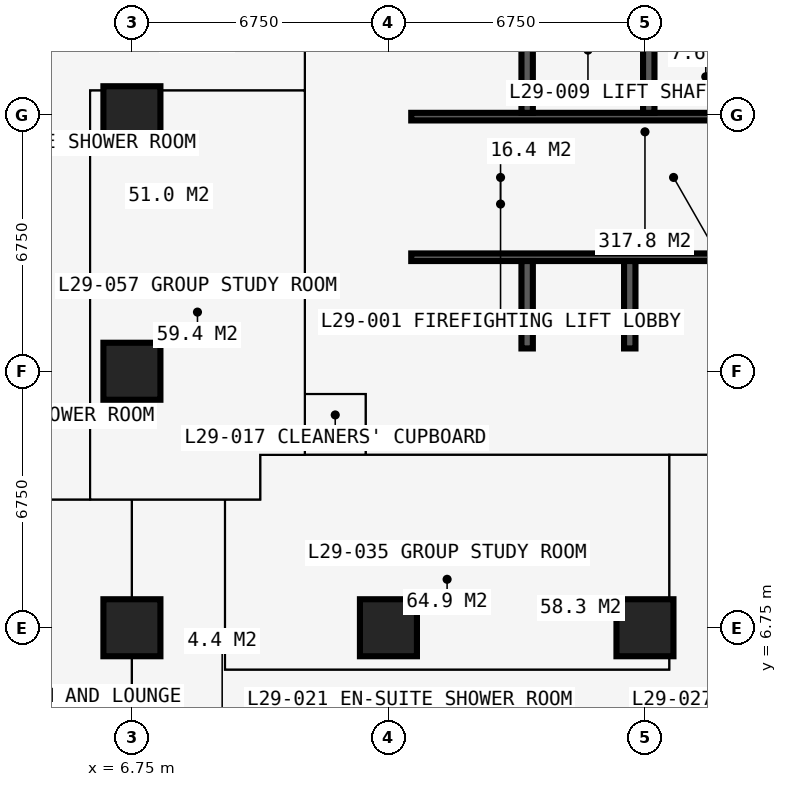
"""IFC4 building model, lengths in metres.
Left out: names, types, materials, properties, quantities, classifications, styles, units other than length and angle.
Written with IfcOpenShell. Run it as: python <this file> out.ifc"""

import sys

from ifc_helpers import new_model, si_unit, direction, frame, frame_2d, origin, origin_2d, place, context, subcontext, project, spatial, rectangle, extrude, element, fill, save


model = new_model("IFC4")
c1 = context("Model", 3, precision=1e-05, world=origin(), true_north=direction((0.0, 1.0)))
c2 = subcontext(c1, "Body", "Model", "MODEL_VIEW")
j1 = project(units=[si_unit("LENGTHUNIT", "METRE"), si_unit("PLANEANGLEUNIT", "RADIAN")], contexts=[c1])
p1 = place(None, origin())
s1 = spatial("IfcSite", under=j1, at=p1, CompositionType="ELEMENT")
p2 = place(p1, origin())
s2 = spatial("IfcBuilding", under=s1, at=p2, CompositionType="ELEMENT")
p3 = place(p2, frame((0.0, 0.0, 108.9)))
s3 = spatial("IfcBuildingStorey", under=s2, at=p3, CompositionType="ELEMENT", Elevation=108.9)
for number, where, z_axis, x_axis in (
    (1, (6.75, 6.75, 0.0), (0.0, 0.0, 1.0), (1.0, 0.0, 0.0)),
    (2, (6.75, 13.5, 0.0), (0.0, 0.0, 1.0), (1.0, 0.0, 0.0)),
    (3, (6.75, 20.25, 0.0), (0.0, 0.0, 1.0), (1.0, 0.0, 0.0)),
    (4, (13.5, 6.75, 0.0), (0.0, 0.0, 1.0), (1.0, 0.0, 0.0)),
    (5, (20.25, 6.75, 0.0), (0.0, 0.0, 1.0), (1.0, 0.0, 0.0)),
):
    element("IfcColumn", number, at=place(p3, frame(where, z_axis=z_axis, x_axis=x_axis)), inside=s3, PredefinedType="COLUMN", context=c2, shape_type="SweptSolid", body=[
        extrude(rectangle(XDim=1.5, YDim=1.5, at=origin_2d()), origin(), (0.0, 0.0, 1.0), 3.6),
    ])
p4 = place(p3, frame((12.9, 13.5, 0.0), z_axis=(0.0, 0.0, 1.0), x_axis=(1.0, 0.0, 0.0)))
e6 = element("IfcWall", 6, at=p4, inside=s3, PredefinedType="SHEAR", context=c2, shape_type="SweptSolid", body=[
    extrude(rectangle(XDim=14.7, YDim=1.2, at=frame_2d((7.35, 0.0))), origin(), (0.0, 0.0, 1.0), 3.6),
])
p5 = place(p3, frame((13.5, 26.4, 0.0), z_axis=(0.0, 0.0, 1.0), x_axis=(0.0, -1.0, 0.0)))
e7 = element("IfcWall", 7, at=p5, inside=s3, PredefinedType="SHEAR", context=c2, shape_type="SweptSolid", body=[
    extrude(rectangle(XDim=12.3, YDim=1.2, at=frame_2d((6.15, 0.0))), origin(), (0.0, 0.0, 1.0), 3.6),
])
p6 = place(p5, frame((7.45, 0.0, 0.0)))
e8 = element("IfcOpeningElement", 8, at=p6, cuts=e7, PredefinedType="OPENING", context=c2, shape_type="SweptSolid", body=[
    extrude(rectangle(XDim=1.2, YDim=2.2, at=frame_2d((0.6, 1.1))), frame((0.0, 0.61, 0.0), z_axis=(0.0, -1.0, 0.0), x_axis=(1.0, 0.0, 0.0)), (0.0, 0.0, 1.0), 1.22),
])
p7 = place(p3, frame((14.1, 16.5, 0.0), z_axis=(0.0, 0.0, 1.0), x_axis=(1.0, 0.0, 0.0)))
e9 = element("IfcWall", 9, at=p7, inside=s3, PredefinedType="SHEAR", context=c2, shape_type="SweptSolid", body=[
    extrude(rectangle(XDim=12.3, YDim=0.2, at=frame_2d((6.15, 0.0))), origin(), (0.0, 0.0, 1.0), 3.6),
])
p8 = place(p7, frame((0.9, 0.0, 0.0)))
e10 = element("IfcOpeningElement", 10, at=p8, cuts=e9, PredefinedType="OPENING", context=c2, shape_type="SweptSolid", body=[
    extrude(rectangle(XDim=1.1, YDim=2.2, at=frame_2d((0.55, 1.1))), frame((0.0, 0.11, 0.0), z_axis=(0.0, -1.0, 0.0), x_axis=(1.0, 0.0, 0.0)), (0.0, 0.0, 1.0), 0.22),
])
p9 = place(p7, frame((9.5, 0.0, 0.0)))
e11 = element("IfcOpeningElement", 11, at=p9, cuts=e9, PredefinedType="OPENING", context=c2, shape_type="SweptSolid", body=[
    extrude(rectangle(XDim=1.1, YDim=2.2, at=frame_2d((0.55, 1.1))), frame((0.0, 0.11, 0.0), z_axis=(0.0, -1.0, 0.0), x_axis=(1.0, 0.0, 0.0)), (0.0, 0.0, 1.0), 0.22),
])
p10 = place(p3, frame((14.1, 20.2, 0.0), z_axis=(0.0, 0.0, 1.0), x_axis=(1.0, 0.0, 0.0)))
e12 = element("IfcWall", 12, at=p10, inside=s3, PredefinedType="SHEAR", context=c2, shape_type="SweptSolid", body=[
    extrude(rectangle(XDim=12.3, YDim=0.2, at=frame_2d((6.15, 0.0))), origin(), (0.0, 0.0, 1.0), 3.6),
])
p11 = place(p10, frame((0.35, 0.0, 0.0)))
e13 = element("IfcOpeningElement", 13, at=p11, cuts=e12, PredefinedType="OPENING", context=c2, shape_type="SweptSolid", body=[
    extrude(rectangle(XDim=1.1, YDim=2.2, at=frame_2d((0.55, 1.1))), frame((0.0, 0.11, 0.0), z_axis=(0.0, -1.0, 0.0), x_axis=(1.0, 0.0, 0.0)), (0.0, 0.0, 1.0), 0.22),
])
p12 = place(p10, frame((9.75, 0.0, 0.0)))
e14 = element("IfcOpeningElement", 14, at=p12, cuts=e12, PredefinedType="OPENING", context=c2, shape_type="SweptSolid", body=[
    extrude(rectangle(XDim=1.1, YDim=2.2, at=frame_2d((0.55, 1.1))), frame((0.0, 0.11, 0.0), z_axis=(0.0, -1.0, 0.0), x_axis=(1.0, 0.0, 0.0)), (0.0, 0.0, 1.0), 0.22),
])
p13 = place(p3, frame((17.15, 20.3, 0.0), z_axis=(0.0, 0.0, 1.0), x_axis=(0.0, 1.0, 0.0)))
e15 = element("IfcWall", 15, at=p13, inside=s3, PredefinedType="SHEAR", context=c2, shape_type="SweptSolid", body=[
    extrude(rectangle(XDim=6.1, YDim=0.3, at=frame_2d((3.05, 0.0))), origin(), (0.0, 0.0, 1.0), 3.6),
])
p14 = place(p3, frame((20.35, 20.3, 0.0), z_axis=(0.0, 0.0, 1.0), x_axis=(0.0, 1.0, 0.0)))
e16 = element("IfcWall", 16, at=p14, inside=s3, PredefinedType="SHEAR", context=c2, shape_type="SweptSolid", body=[
    extrude(rectangle(XDim=2.8, YDim=0.3, at=frame_2d((1.4, 0.0))), origin(), (0.0, 0.0, 1.0), 3.6),
])
for number, where, z_axis, x_axis in (
    (17, (17.15, 14.1, 0.0), (0.0, 0.0, 1.0), (0.0, 1.0, 0.0)),
    (18, (19.85, 14.1, 0.0), (0.0, 0.0, 1.0), (0.0, 1.0, 0.0)),
):
    element("IfcWall", number, at=place(p3, frame(where, z_axis=z_axis, x_axis=x_axis)), inside=s3, PredefinedType="SHEAR", context=c2, shape_type="SweptSolid", body=[
        extrude(rectangle(XDim=2.3, YDim=0.3, at=frame_2d((1.15, 0.0))), origin(), (0.0, 0.0, 1.0), 3.6),
    ])
p15 = place(p3, frame((18.875, 16.6, 0.0), z_axis=(0.0, 0.0, 1.0), x_axis=(0.0, 1.0, 0.0)))
e19 = element("IfcWall", 19, at=p15, inside=s3, PredefinedType="PARTITIONING", context=c2, shape_type="SweptSolid", body=[
    extrude(rectangle(XDim=3.5, YDim=0.15, at=frame_2d((1.75, 0.0))), origin(), (0.0, 0.0, 1.0), 3.375),
])
p16 = place(p15, frame((1.15, 0.0, 0.0)))
e20 = element("IfcOpeningElement", 20, at=p16, cuts=e19, PredefinedType="OPENING", context=c2, shape_type="SweptSolid", body=[
    extrude(rectangle(XDim=1.2, YDim=2.2, at=frame_2d((0.6, 1.1))), frame((0.0, 0.085, 0.0), z_axis=(0.0, -1.0, 0.0), x_axis=(1.0, 0.0, 0.0)), (0.0, 0.0, 1.0), 0.17),
])
p17 = place(p3, frame((21.625, 16.6, 0.0), z_axis=(0.0, 0.0, 1.0), x_axis=(0.0, 1.0, 0.0)))
e21 = element("IfcWall", 21, at=p17, inside=s3, PredefinedType="PARTITIONING", context=c2, shape_type="SweptSolid", body=[
    extrude(rectangle(XDim=3.5, YDim=0.15, at=frame_2d((1.75, 0.0))), origin(), (0.0, 0.0, 1.0), 3.375),
])
p18 = place(p17, frame((1.15, 0.0, 0.0)))
e22 = element("IfcOpeningElement", 22, at=p18, cuts=e21, PredefinedType="OPENING", context=c2, shape_type="SweptSolid", body=[
    extrude(rectangle(XDim=1.2, YDim=2.2, at=frame_2d((0.6, 1.1))), frame((0.0, 0.085, 0.0), z_axis=(0.0, -1.0, 0.0), x_axis=(1.0, 0.0, 0.0)), (0.0, 0.0, 1.0), 0.17),
])
p19 = place(p3, frame((20.38, 16.6, 0.0), z_axis=(0.0, 0.0, 1.0), x_axis=(0.0, 1.0, 0.0)))
e23 = element("IfcWall", 23, at=p19, inside=s3, PredefinedType="PARTITIONING", context=c2, shape_type="SweptSolid", body=[
    extrude(rectangle(XDim=3.5, YDim=0.15, at=frame_2d((1.75, 0.0))), origin(), (0.0, 0.0, 1.0), 3.375),
])
p20 = place(p3, frame((-0.734, 10.125, 0.0), z_axis=(0.0, 0.0, 1.0), x_axis=(1.0, 0.0, 0.0)))
e24 = element("IfcWall", 24, at=p20, inside=s3, PredefinedType="PARTITIONING", context=c2, shape_type="SweptSolid", body=[
    extrude(rectangle(XDim=10.859, YDim=0.15, at=frame_2d((5.429, 0.0))), origin(), (0.0, 0.0, 1.0), 3.375),
])
p21 = place(p20, frame((5.134, 0.0, 0.0)))
e25 = element("IfcOpeningElement", 25, at=p21, cuts=e24, PredefinedType="OPENING", context=c2, shape_type="SweptSolid", body=[
    extrude(rectangle(XDim=1.0, YDim=2.2, at=frame_2d((0.5, 1.1))), frame((0.0, 0.085, 0.0), z_axis=(0.0, -1.0, 0.0), x_axis=(1.0, 0.0, 0.0)), (0.0, 0.0, 1.0), 0.17),
])
p22 = place(p20, frame((8.234, 0.0, 0.0)))
e26 = element("IfcOpeningElement", 26, at=p22, cuts=e24, PredefinedType="OPENING", context=c2, shape_type="SweptSolid", body=[
    extrude(rectangle(XDim=0.95, YDim=2.2, at=frame_2d((0.475, 1.1))), frame((0.0, 0.085, 0.0), z_axis=(0.0, -1.0, 0.0), x_axis=(1.0, 0.0, 0.0)), (0.0, 0.0, 1.0), 0.17),
])
p23 = place(p3, frame((5.65, 10.125, 0.0), z_axis=(0.0, 0.0, 1.0), x_axis=(0.0, 1.0, 0.0)))
e27 = element("IfcWall", 27, at=p23, inside=s3, PredefinedType="PARTITIONING", context=c2, shape_type="SweptSolid", body=[
    extrude(rectangle(XDim=10.762, YDim=0.15, at=frame_2d((5.381, 0.0))), origin(), (0.0, 0.0, 1.0), 3.375),
])
p24 = place(p3, frame((5.65, 20.887, 0.0), z_axis=(0.0, 0.0, 1.0), x_axis=(1.0, 0.0, 0.0)))
e28 = element("IfcWall", 28, at=p24, inside=s3, PredefinedType="PARTITIONING", context=c2, shape_type="SweptSolid", body=[
    extrude(rectangle(XDim=5.65, YDim=0.15, at=frame_2d((2.825, 0.0))), origin(), (0.0, 0.0, 1.0), 3.375),
])
p25 = place(p3, frame((6.75, -0.734, 0.0), z_axis=(0.0, 0.0, 1.0), x_axis=(0.0, 1.0, 0.0)))
e29 = element("IfcWall", 29, at=p25, inside=s3, PredefinedType="PARTITIONING", context=c2, shape_type="SweptSolid", body=[
    extrude(rectangle(XDim=10.859, YDim=0.15, at=frame_2d((5.429, 0.0))), origin(), (0.0, 0.0, 1.0), 2.877),
])
p26 = place(p3, frame((9.2, 5.65, 0.0), z_axis=(0.0, 0.0, 1.0), x_axis=(0.0, 1.0, 0.0)))
e30 = element("IfcWall", 30, at=p26, inside=s3, PredefinedType="PARTITIONING", context=c2, shape_type="SweptSolid", body=[
    extrude(rectangle(XDim=4.475, YDim=0.15, at=frame_2d((2.238, 0.0))), origin(), (0.0, 0.0, 1.0), 3.375),
])
p27 = place(p3, frame((9.2, 5.65, 0.0), z_axis=(0.0, 0.0, 1.0), x_axis=(1.0, 0.0, 0.0)))
e31 = element("IfcWall", 31, at=p27, inside=s3, PredefinedType="PARTITIONING", context=c2, shape_type="SweptSolid", body=[
    extrude(rectangle(XDim=11.688, YDim=0.15, at=frame_2d((5.844, 0.0))), origin(), (0.0, 0.0, 1.0), 3.375),
])
p28 = place(p27, frame((5.35, 0.0, 0.0)))
e32 = element("IfcOpeningElement", 32, at=p28, cuts=e31, PredefinedType="OPENING", context=c2, shape_type="SweptSolid", body=[
    extrude(rectangle(XDim=0.95, YDim=2.2, at=frame_2d((0.475, 1.1))), frame((0.0, 0.085, 0.0), z_axis=(0.0, -1.0, 0.0), x_axis=(1.0, 0.0, 0.0)), (0.0, 0.0, 1.0), 0.17),
])
p29 = place(p3, frame((10.125, 10.125, 0.0), z_axis=(0.0, 0.0, 1.0), x_axis=(0.0, 1.0, 0.0)))
e33 = element("IfcWall", 33, at=p29, inside=s3, PredefinedType="PARTITIONING", context=c2, shape_type="SweptSolid", body=[
    extrude(rectangle(XDim=1.175, YDim=0.15, at=frame_2d((0.587, 0.0))), origin(), (0.0, 0.0, 1.0), 3.375),
])
p30 = place(p3, frame((10.125, 11.3, 0.0), z_axis=(0.0, 0.0, 1.0), x_axis=(1.0, 0.0, 0.0)))
e34 = element("IfcWall", 34, at=p30, inside=s3, PredefinedType="PARTITIONING", context=c2, shape_type="SweptSolid", body=[
    extrude(rectangle(XDim=20.675, YDim=0.15, at=frame_2d((10.337, 0.0))), origin(), (0.0, 0.0, 1.0), 3.375),
])
p31 = place(p30, frame((11.312, 0.0, 0.0)))
e35 = element("IfcOpeningElement", 35, at=p31, cuts=e34, PredefinedType="OPENING", context=c2, shape_type="SweptSolid", body=[
    extrude(rectangle(XDim=1.0, YDim=2.2, at=frame_2d((0.5, 1.1))), frame((0.0, 0.085, 0.0), z_axis=(0.0, -1.0, 0.0), x_axis=(1.0, 0.0, 0.0)), (0.0, 0.0, 1.0), 0.17),
])
p32 = place(p3, frame((11.3, 11.3, 0.0), z_axis=(0.0, 0.0, 1.0), x_axis=(0.0, 1.0, 0.0)))
e36 = element("IfcWall", 36, at=p32, inside=s3, PredefinedType="PARTITIONING", context=c2, shape_type="SweptSolid", body=[
    extrude(rectangle(XDim=19.075, YDim=0.15, at=frame_2d((9.538, 0.0))), origin(), (0.0, 0.0, 1.0), 3.375),
])
p33 = place(p32, frame((13.95, 0.0, 0.0)))
e37 = element("IfcOpeningElement", 37, at=p33, cuts=e36, PredefinedType="OPENING", context=c2, shape_type="SweptSolid", body=[
    extrude(rectangle(XDim=1.0, YDim=2.2, at=frame_2d((0.5, 1.1))), frame((0.0, 0.085, 0.0), z_axis=(0.0, -1.0, 0.0), x_axis=(1.0, 0.0, 0.0)), (0.0, 0.0, 1.0), 0.17),
])
p34 = place(p3, frame((11.3, 12.9, 0.0), z_axis=(0.0, 0.0, 1.0), x_axis=(1.0, 0.0, 0.0)))
e38 = element("IfcWall", 38, at=p34, inside=s3, PredefinedType="PARTITIONING", context=c2, shape_type="SweptSolid", body=[
    extrude(rectangle(XDim=1.6, YDim=0.15, at=frame_2d((0.8, 0.0))), origin(), (0.0, 0.0, 1.0), 2.806),
])
p35 = place(p34, frame((0.3, 0.0, 0.0)))
e39 = element("IfcOpeningElement", 39, at=p35, cuts=e38, PredefinedType="OPENING", context=c2, shape_type="SweptSolid", body=[
    extrude(rectangle(XDim=0.95, YDim=2.2, at=frame_2d((0.475, 1.1))), frame((0.0, 0.085, 0.0), z_axis=(0.0, -1.0, 0.0), x_axis=(1.0, 0.0, 0.0)), (0.0, 0.0, 1.0), 0.17),
])
p36 = place(p3, frame((12.9, 11.3, 0.0), z_axis=(0.0, 0.0, 1.0), x_axis=(0.0, 1.0, 0.0)))
e40 = element("IfcWall", 40, at=p36, inside=s3, PredefinedType="PARTITIONING", context=c2, shape_type="SweptSolid", body=[
    extrude(rectangle(XDim=1.6, YDim=0.15, at=frame_2d((0.8, 0.0))), origin(), (0.0, 0.0, 1.0), 3.375),
])
p37 = place(p3, frame((20.887, 5.65, 0.0), z_axis=(0.0, 0.0, 1.0), x_axis=(0.0, 1.0, 0.0)))
e41 = element("IfcWall", 41, at=p37, inside=s3, PredefinedType="PARTITIONING", context=c2, shape_type="SweptSolid", body=[
    extrude(rectangle(XDim=5.65, YDim=0.15, at=frame_2d((2.825, 0.0))), origin(), (0.0, 0.0, 1.0), 3.375),
])
p38 = place(p8, origin())
e42 = element("IfcDoor", 42, at=p38, inside=s3, OperationType="DOUBLE_DOOR_SLIDING", PredefinedType="DOOR", context=c2, shape_type="SweptSolid", body=[
    extrude(rectangle(XDim=1.1, YDim=2.2, at=frame_2d((0.55, 1.1))), frame((0.0, 0.025, 0.0), z_axis=(0.0, -1.0, 0.0), x_axis=(1.0, 0.0, 0.0)), (0.0, 0.0, 1.0), 0.05),
])
fill(e10, e42)
p39 = place(p6, origin())
e43 = element("IfcDoor", 43, at=p39, inside=s3, OperationType="DOUBLE_DOOR_SINGLE_SWING", PredefinedType="DOOR", context=c2, shape_type="SweptSolid", body=[
    extrude(rectangle(XDim=1.2, YDim=2.2, at=frame_2d((0.6, 1.1))), frame((0.0, 0.025, 0.0), z_axis=(0.0, -1.0, 0.0), x_axis=(1.0, 0.0, 0.0)), (0.0, 0.0, 1.0), 0.05),
])
fill(e8, e43)
p40 = place(p16, origin())
e44 = element("IfcDoor", 44, at=p40, inside=s3, OperationType="DOUBLE_DOOR_SINGLE_SWING", PredefinedType="DOOR", context=c2, shape_type="SweptSolid", body=[
    extrude(rectangle(XDim=1.2, YDim=2.2, at=frame_2d((0.6, 1.1))), frame((0.0, 0.025, 0.0), z_axis=(0.0, -1.0, 0.0), x_axis=(1.0, 0.0, 0.0)), (0.0, 0.0, 1.0), 0.05),
])
fill(e20, e44)
p41 = place(p18, origin())
e45 = element("IfcDoor", 45, at=p41, inside=s3, OperationType="DOUBLE_DOOR_SINGLE_SWING", PredefinedType="DOOR", context=c2, shape_type="SweptSolid", body=[
    extrude(rectangle(XDim=1.2, YDim=2.2, at=frame_2d((0.6, 1.1))), frame((0.0, 0.025, 0.0), z_axis=(0.0, -1.0, 0.0), x_axis=(1.0, 0.0, 0.0)), (0.0, 0.0, 1.0), 0.05),
])
fill(e22, e45)
p42 = place(p11, origin())
e46 = element("IfcDoor", 46, at=p42, inside=s3, OperationType="SINGLE_SWING_LEFT", PredefinedType="DOOR", context=c2, shape_type="SweptSolid", body=[
    extrude(rectangle(XDim=1.1, YDim=2.2, at=frame_2d((0.55, 1.1))), frame((0.0, 0.025, 0.0), z_axis=(0.0, -1.0, 0.0), x_axis=(1.0, 0.0, 0.0)), (0.0, 0.0, 1.0), 0.05),
])
fill(e13, e46)
p43 = place(p35, origin())
e47 = element("IfcDoor", 47, at=p43, inside=s3, OperationType="SINGLE_SWING_LEFT", PredefinedType="DOOR", context=c2, shape_type="SweptSolid", body=[
    extrude(rectangle(XDim=0.95, YDim=2.2, at=frame_2d((0.475, 1.1))), frame((0.0, 0.025, 0.0), z_axis=(0.0, -1.0, 0.0), x_axis=(1.0, 0.0, 0.0)), (0.0, 0.0, 1.0), 0.05),
])
fill(e39, e47)
p44 = place(p21, origin())
e48 = element("IfcDoor", 48, at=p44, inside=s3, OperationType="SINGLE_SWING_LEFT", PredefinedType="DOOR", context=c2, shape_type="SweptSolid", body=[
    extrude(rectangle(XDim=1.0, YDim=2.2, at=frame_2d((0.5, 1.1))), frame((0.0, 0.025, 0.0), z_axis=(0.0, -1.0, 0.0), x_axis=(1.0, 0.0, 0.0)), (0.0, 0.0, 1.0), 0.05),
])
fill(e25, e48)
p45 = place(p31, origin())
e49 = element("IfcDoor", 49, at=p45, inside=s3, OperationType="SINGLE_SWING_LEFT", PredefinedType="DOOR", context=c2, shape_type="SweptSolid", body=[
    extrude(rectangle(XDim=1.0, YDim=2.2, at=frame_2d((0.5, 1.1))), frame((0.0, 0.025, 0.0), z_axis=(0.0, -1.0, 0.0), x_axis=(1.0, 0.0, 0.0)), (0.0, 0.0, 1.0), 0.05),
])
fill(e35, e49)
p46 = place(p28, origin())
e50 = element("IfcDoor", 50, at=p46, inside=s3, OperationType="SINGLE_SWING_LEFT", PredefinedType="DOOR", context=c2, shape_type="SweptSolid", body=[
    extrude(rectangle(XDim=0.95, YDim=2.2, at=frame_2d((0.475, 1.1))), frame((0.0, 0.025, 0.0), z_axis=(0.0, -1.0, 0.0), x_axis=(1.0, 0.0, 0.0)), (0.0, 0.0, 1.0), 0.05),
])
fill(e32, e50)
p47 = place(p22, origin())
e51 = element("IfcDoor", 51, at=p47, inside=s3, OperationType="SINGLE_SWING_LEFT", PredefinedType="DOOR", context=c2, shape_type="SweptSolid", body=[
    extrude(rectangle(XDim=0.95, YDim=2.2, at=frame_2d((0.475, 1.1))), frame((0.0, 0.025, 0.0), z_axis=(0.0, -1.0, 0.0), x_axis=(1.0, 0.0, 0.0)), (0.0, 0.0, 1.0), 0.05),
])
fill(e26, e51)
save(model, sys.argv[1])
